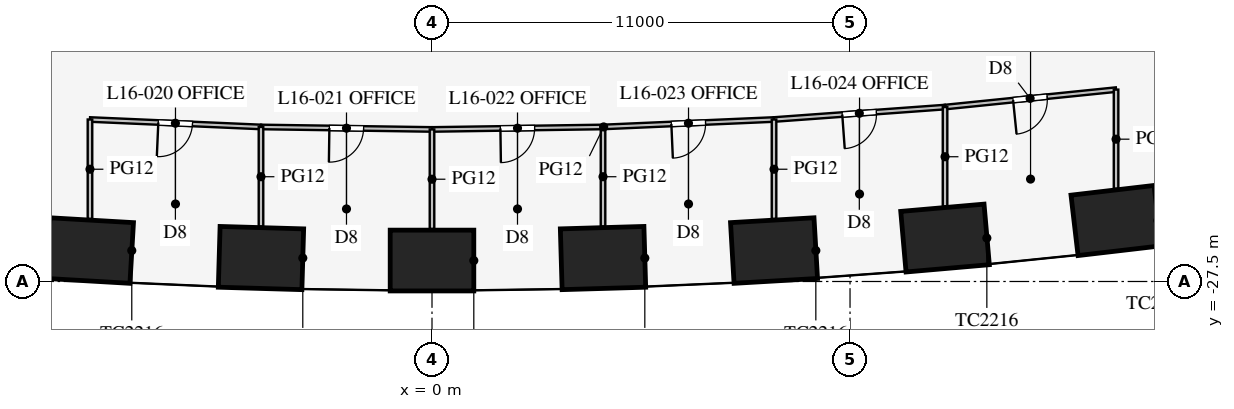
"""IFC4 building model, lengths in metres.
Left out: names, types, materials, properties, quantities, classifications, styles, units other than length and angle.
Written with IfcOpenShell. Run it as: python <this file> out.ifc"""

import sys

from ifc_helpers import new_model, si_unit, direction, frame, frame_2d, origin, origin_2d, place, context, subcontext, project, spatial, rectangle, extrude, element, fill, save


model = new_model("IFC4")
c1 = context("Model", 3, precision=1e-05, world=origin(), true_north=direction((0.0, 1.0)))
c2 = subcontext(c1, "Body", "Model", "MODEL_VIEW")
j1 = project(units=[si_unit("LENGTHUNIT", "METRE"), si_unit("PLANEANGLEUNIT", "RADIAN")], contexts=[c1])
p1 = place(None, origin())
s1 = spatial("IfcSite", under=j1, at=p1, CompositionType="ELEMENT")
p2 = place(p1, origin())
s2 = spatial("IfcBuilding", under=s1, at=p2, CompositionType="ELEMENT")
p3 = place(p2, frame((0.0, 0.0, 71.1)))
s3 = spatial("IfcBuildingStorey", under=s2, at=p3, CompositionType="ELEMENT", Elevation=71.1)
for number, where, z_axis, x_axis in (
    (1, (-9.0, -26.686, 0.0), (0.0, 0.0, 1.0), (0.998, -0.058, 0.0)),
    (2, (-4.5, -26.883, 0.0), (0.0, 0.0, 1.0), (1.0, -0.029, 0.0)),
    (3, (0.0, -26.949, 0.0), (0.0, 0.0, 1.0), (1.0, 0.0, 0.0)),
    (4, (4.5, -26.883, 0.0), (0.0, 0.0, 1.0), (1.0, 0.029, 0.0)),
    (5, (9.0, -26.686, 0.0), (0.0, 0.0, 1.0), (0.998, 0.058, 0.0)),
    (6, (13.5, -26.357, 0.0), (0.0, 0.0, 1.0), (0.996, 0.087, 0.0)),
    (7, (18.0, -25.895, 0.0), (0.0, 0.0, 1.0), (0.993, 0.116, 0.0)),
):
    element("IfcColumn", number, at=place(p3, frame(where, z_axis=z_axis, x_axis=x_axis)), inside=s3, PredefinedType="COLUMN", context=c2, shape_type="SweptSolid", body=[
        extrude(rectangle(XDim=2.2, YDim=1.6, at=origin_2d()), origin(), (0.0, 0.0, 1.0), 4.2),
    ])
p4 = place(p3, frame((0.0, -23.499, 0.0), z_axis=(0.0, 0.0, 1.0), x_axis=(0.999894311967, 0.014538393859, 0.0)))
e8 = element("IfcWall", 8, at=p4, inside=s3, PredefinedType="PARTITIONING", context=c2, shape_type="SweptSolid", body=[
    extrude(rectangle(XDim=4.5, YDim=0.12, at=frame_2d((2.25, 0.0))), origin(), (0.0, 0.0, 1.0), 2.9),
])
p5 = place(p4, frame((1.8, 0.0, 0.15)))
e9 = element("IfcOpeningElement", 9, at=p5, cuts=e8, PredefinedType="OPENING", context=c2, shape_type="SweptSolid", body=[
    extrude(rectangle(XDim=0.9, YDim=2.1, at=frame_2d((0.45, 1.05))), frame((0.0, 0.07, 0.0), z_axis=(0.0, -1.0, 0.0), x_axis=(1.0, 0.0, 0.0)), (0.0, 0.0, 1.0), 0.14),
])
p6 = place(p3, frame((13.5, -22.91, 0.0), z_axis=(0.0, 0.0, 1.0), x_axis=(0.994833141332, 0.101523499286, 0.0)))
e10 = element("IfcWall", 10, at=p6, inside=s3, PredefinedType="PARTITIONING", context=c2, shape_type="SweptSolid", body=[
    extrude(rectangle(XDim=4.523, YDim=0.12, at=frame_2d((2.262, 0.0))), origin(), (0.0, 0.0, 1.0), 2.9),
])
p7 = place(p6, frame((1.8, 0.0, 0.15)))
e11 = element("IfcOpeningElement", 11, at=p7, cuts=e10, PredefinedType="OPENING", context=c2, shape_type="SweptSolid", body=[
    extrude(rectangle(XDim=0.9, YDim=2.1, at=frame_2d((0.45, 1.05))), frame((0.0, 0.07, 0.0), z_axis=(0.0, -1.0, 0.0), x_axis=(1.0, 0.0, 0.0)), (0.0, 0.0, 1.0), 0.14),
])
p8 = place(p3, frame((4.5, -23.433, 0.0), z_axis=(0.0, 0.0, 1.0), x_axis=(0.999052370647, 0.043524254212, 0.0)))
e12 = element("IfcWall", 12, at=p8, inside=s3, PredefinedType="PARTITIONING", context=c2, shape_type="SweptSolid", body=[
    extrude(rectangle(XDim=4.504, YDim=0.12, at=frame_2d((2.252, 0.0))), origin(), (0.0, 0.0, 1.0), 2.9),
])
p9 = place(p8, frame((1.8, 0.0, 0.15)))
e13 = element("IfcOpeningElement", 13, at=p9, cuts=e12, PredefinedType="OPENING", context=c2, shape_type="SweptSolid", body=[
    extrude(rectangle(XDim=0.9, YDim=2.1, at=frame_2d((0.45, 1.05))), frame((0.0, 0.07, 0.0), z_axis=(0.0, -1.0, 0.0), x_axis=(1.0, 0.0, 0.0)), (0.0, 0.0, 1.0), 0.14),
])
p10 = place(p3, frame((9.0, -23.237, 0.0), z_axis=(0.0, 0.0, 1.0), x_axis=(0.997363894896, 0.072562119306, 0.0)))
e14 = element("IfcWall", 14, at=p10, inside=s3, PredefinedType="PARTITIONING", context=c2, shape_type="SweptSolid", body=[
    extrude(rectangle(XDim=4.512, YDim=0.12, at=frame_2d((2.256, 0.0))), origin(), (0.0, 0.0, 1.0), 2.9),
])
p11 = place(p10, frame((1.8, 0.0, 0.15)))
e15 = element("IfcOpeningElement", 15, at=p11, cuts=e14, PredefinedType="OPENING", context=c2, shape_type="SweptSolid", body=[
    extrude(rectangle(XDim=0.9, YDim=2.1, at=frame_2d((0.45, 1.05))), frame((0.0, 0.07, 0.0), z_axis=(0.0, -1.0, 0.0), x_axis=(1.0, 0.0, 0.0)), (0.0, 0.0, 1.0), 0.14),
])
p12 = place(p3, frame((-4.5, -23.433, 0.0), z_axis=(0.0, 0.0, 1.0), x_axis=(0.999894311967, -0.014538393859, 0.0)))
e16 = element("IfcWall", 16, at=p12, inside=s3, PredefinedType="PARTITIONING", context=c2, shape_type="SweptSolid", body=[
    extrude(rectangle(XDim=4.5, YDim=0.12, at=frame_2d((2.25, 0.0))), origin(), (0.0, 0.0, 1.0), 2.9),
])
p13 = place(p12, frame((1.8, 0.0, 0.15)))
e17 = element("IfcOpeningElement", 17, at=p13, cuts=e16, PredefinedType="OPENING", context=c2, shape_type="SweptSolid", body=[
    extrude(rectangle(XDim=0.9, YDim=2.1, at=frame_2d((0.45, 1.05))), frame((0.0, 0.07, 0.0), z_axis=(0.0, -1.0, 0.0), x_axis=(1.0, 0.0, 0.0)), (0.0, 0.0, 1.0), 0.14),
])
p14 = place(p3, frame((-9.0, -23.237, 0.0), z_axis=(0.0, 0.0, 1.0), x_axis=(0.999052370647, -0.043524254212, 0.0)))
e18 = element("IfcWall", 18, at=p14, inside=s3, PredefinedType="PARTITIONING", context=c2, shape_type="SweptSolid", body=[
    extrude(rectangle(XDim=4.504, YDim=0.12, at=frame_2d((2.252, 0.0))), origin(), (0.0, 0.0, 1.0), 2.9),
])
p15 = place(p14, frame((1.8, 0.0, 0.15)))
e19 = element("IfcOpeningElement", 19, at=p15, cuts=e18, PredefinedType="OPENING", context=c2, shape_type="SweptSolid", body=[
    extrude(rectangle(XDim=0.9, YDim=2.1, at=frame_2d((0.45, 1.05))), frame((0.0, 0.07, 0.0), z_axis=(0.0, -1.0, 0.0), x_axis=(1.0, 0.0, 0.0)), (0.0, 0.0, 1.0), 0.14),
])
p16 = place(p3, frame((0.0, -23.499, 0.0), z_axis=(0.0, 0.0, 1.0), x_axis=(0.0, -1.0, 0.0)))
e20 = element("IfcWall", 20, at=p16, inside=s3, PredefinedType="PARTITIONING", context=c2, shape_type="SweptSolid", body=[
    extrude(rectangle(XDim=2.62, YDim=0.12, at=frame_2d((1.31, 0.0))), origin(), (0.0, 0.0, 1.0), 2.8),
])
p17 = place(p3, frame((13.5, -22.91, 0.0), z_axis=(0.0, 0.0, 1.0), x_axis=(0.0, -1.0, 0.0)))
e21 = element("IfcWall", 21, at=p17, inside=s3, PredefinedType="PARTITIONING", context=c2, shape_type="SweptSolid", body=[
    extrude(rectangle(XDim=2.614, YDim=0.12, at=frame_2d((1.307, 0.0))), origin(), (0.0, 0.0, 1.0), 2.6),
])
p18 = place(p3, frame((18.0, -22.451, 0.0), z_axis=(0.0, 0.0, 1.0), x_axis=(0.0, -1.0, 0.0)))
e22 = element("IfcWall", 22, at=p18, inside=s3, PredefinedType="PARTITIONING", context=c2, shape_type="SweptSolid", body=[
    extrude(rectangle(XDim=2.609, YDim=0.12, at=frame_2d((1.304, 0.0))), origin(), (0.0, 0.0, 1.0), 2.6),
])
p19 = place(p3, frame((4.5, -23.433, 0.0), z_axis=(0.0, 0.0, 1.0), x_axis=(0.0, -1.0, 0.0)))
e23 = element("IfcWall", 23, at=p19, inside=s3, PredefinedType="PARTITIONING", context=c2, shape_type="SweptSolid", body=[
    extrude(rectangle(XDim=2.619, YDim=0.12, at=frame_2d((1.31, 0.0))), origin(), (0.0, 0.0, 1.0), 2.8),
])
p20 = place(p3, frame((9.0, -23.237, 0.0), z_axis=(0.0, 0.0, 1.0), x_axis=(0.0, -1.0, 0.0)))
e24 = element("IfcWall", 24, at=p20, inside=s3, PredefinedType="PARTITIONING", context=c2, shape_type="SweptSolid", body=[
    extrude(rectangle(XDim=2.617, YDim=0.12, at=frame_2d((1.309, 0.0))), origin(), (0.0, 0.0, 1.0), 2.8),
])
p21 = place(p3, frame((-4.5, -23.433, 0.0), z_axis=(0.0, 0.0, 1.0), x_axis=(0.0, -1.0, 0.0)))
e25 = element("IfcWall", 25, at=p21, inside=s3, PredefinedType="PARTITIONING", context=c2, shape_type="SweptSolid", body=[
    extrude(rectangle(XDim=2.619, YDim=0.12, at=frame_2d((1.31, 0.0))), origin(), (0.0, 0.0, 1.0), 2.8),
])
p22 = place(p3, frame((-9.0, -23.237, 0.0), z_axis=(0.0, 0.0, 1.0), x_axis=(0.0, -1.0, 0.0)))
e26 = element("IfcWall", 26, at=p22, inside=s3, PredefinedType="PARTITIONING", context=c2, shape_type="SweptSolid", body=[
    extrude(rectangle(XDim=2.617, YDim=0.12, at=frame_2d((1.309, 0.0))), origin(), (0.0, 0.0, 1.0), 2.8),
])
p23 = place(p15, frame((0.9, 0.0, 0.0), z_axis=(0.0, 0.0, 1.0), x_axis=(-1.0, 0.0, 0.0)))
e27 = element("IfcDoor", 27, at=p23, inside=s3, OperationType="SINGLE_SWING_RIGHT", PredefinedType="DOOR", context=c2, shape_type="SweptSolid", body=[
    extrude(rectangle(XDim=0.9, YDim=2.1, at=frame_2d((0.45, 1.05))), frame((0.0, 0.025, 0.0), z_axis=(0.0, -1.0, 0.0), x_axis=(1.0, 0.0, 0.0)), (0.0, 0.0, 1.0), 0.05),
])
fill(e19, e27)
p24 = place(p13, frame((0.9, 0.0, 0.0), z_axis=(0.0, 0.0, 1.0), x_axis=(-1.0, 0.0, 0.0)))
e28 = element("IfcDoor", 28, at=p24, inside=s3, OperationType="SINGLE_SWING_RIGHT", PredefinedType="DOOR", context=c2, shape_type="SweptSolid", body=[
    extrude(rectangle(XDim=0.9, YDim=2.1, at=frame_2d((0.45, 1.05))), frame((0.0, 0.025, 0.0), z_axis=(0.0, -1.0, 0.0), x_axis=(1.0, 0.0, 0.0)), (0.0, 0.0, 1.0), 0.05),
])
fill(e17, e28)
p25 = place(p5, frame((0.9, 0.0, 0.0), z_axis=(0.0, 0.0, 1.0), x_axis=(-1.0, 0.0, 0.0)))
e29 = element("IfcDoor", 29, at=p25, inside=s3, OperationType="SINGLE_SWING_RIGHT", PredefinedType="DOOR", context=c2, shape_type="SweptSolid", body=[
    extrude(rectangle(XDim=0.9, YDim=2.1, at=frame_2d((0.45, 1.05))), frame((0.0, 0.025, 0.0), z_axis=(0.0, -1.0, 0.0), x_axis=(1.0, 0.0, 0.0)), (0.0, 0.0, 1.0), 0.05),
])
fill(e9, e29)
p26 = place(p9, frame((0.9, 0.0, 0.0), z_axis=(0.0, 0.0, 1.0), x_axis=(-1.0, 0.0, 0.0)))
e30 = element("IfcDoor", 30, at=p26, inside=s3, OperationType="SINGLE_SWING_RIGHT", PredefinedType="DOOR", context=c2, shape_type="SweptSolid", body=[
    extrude(rectangle(XDim=0.9, YDim=2.1, at=frame_2d((0.45, 1.05))), frame((0.0, 0.025, 0.0), z_axis=(0.0, -1.0, 0.0), x_axis=(1.0, 0.0, 0.0)), (0.0, 0.0, 1.0), 0.05),
])
fill(e13, e30)
p27 = place(p11, frame((0.9, 0.0, 0.0), z_axis=(0.0, 0.0, 1.0), x_axis=(-1.0, 0.0, 0.0)))
e31 = element("IfcDoor", 31, at=p27, inside=s3, OperationType="SINGLE_SWING_RIGHT", PredefinedType="DOOR", context=c2, shape_type="SweptSolid", body=[
    extrude(rectangle(XDim=0.9, YDim=2.1, at=frame_2d((0.45, 1.05))), frame((0.0, 0.025, 0.0), z_axis=(0.0, -1.0, 0.0), x_axis=(1.0, 0.0, 0.0)), (0.0, 0.0, 1.0), 0.05),
])
fill(e15, e31)
p28 = place(p7, frame((0.9, 0.0, 0.0), z_axis=(0.0, 0.0, 1.0), x_axis=(-1.0, 0.0, 0.0)))
e32 = element("IfcDoor", 32, at=p28, inside=s3, OperationType="SINGLE_SWING_RIGHT", PredefinedType="DOOR", context=c2, shape_type="SweptSolid", body=[
    extrude(rectangle(XDim=0.9, YDim=2.1, at=frame_2d((0.45, 1.05))), frame((0.0, 0.025, 0.0), z_axis=(0.0, -1.0, 0.0), x_axis=(1.0, 0.0, 0.0)), (0.0, 0.0, 1.0), 0.05),
])
fill(e11, e32)
save(model, sys.argv[1])
